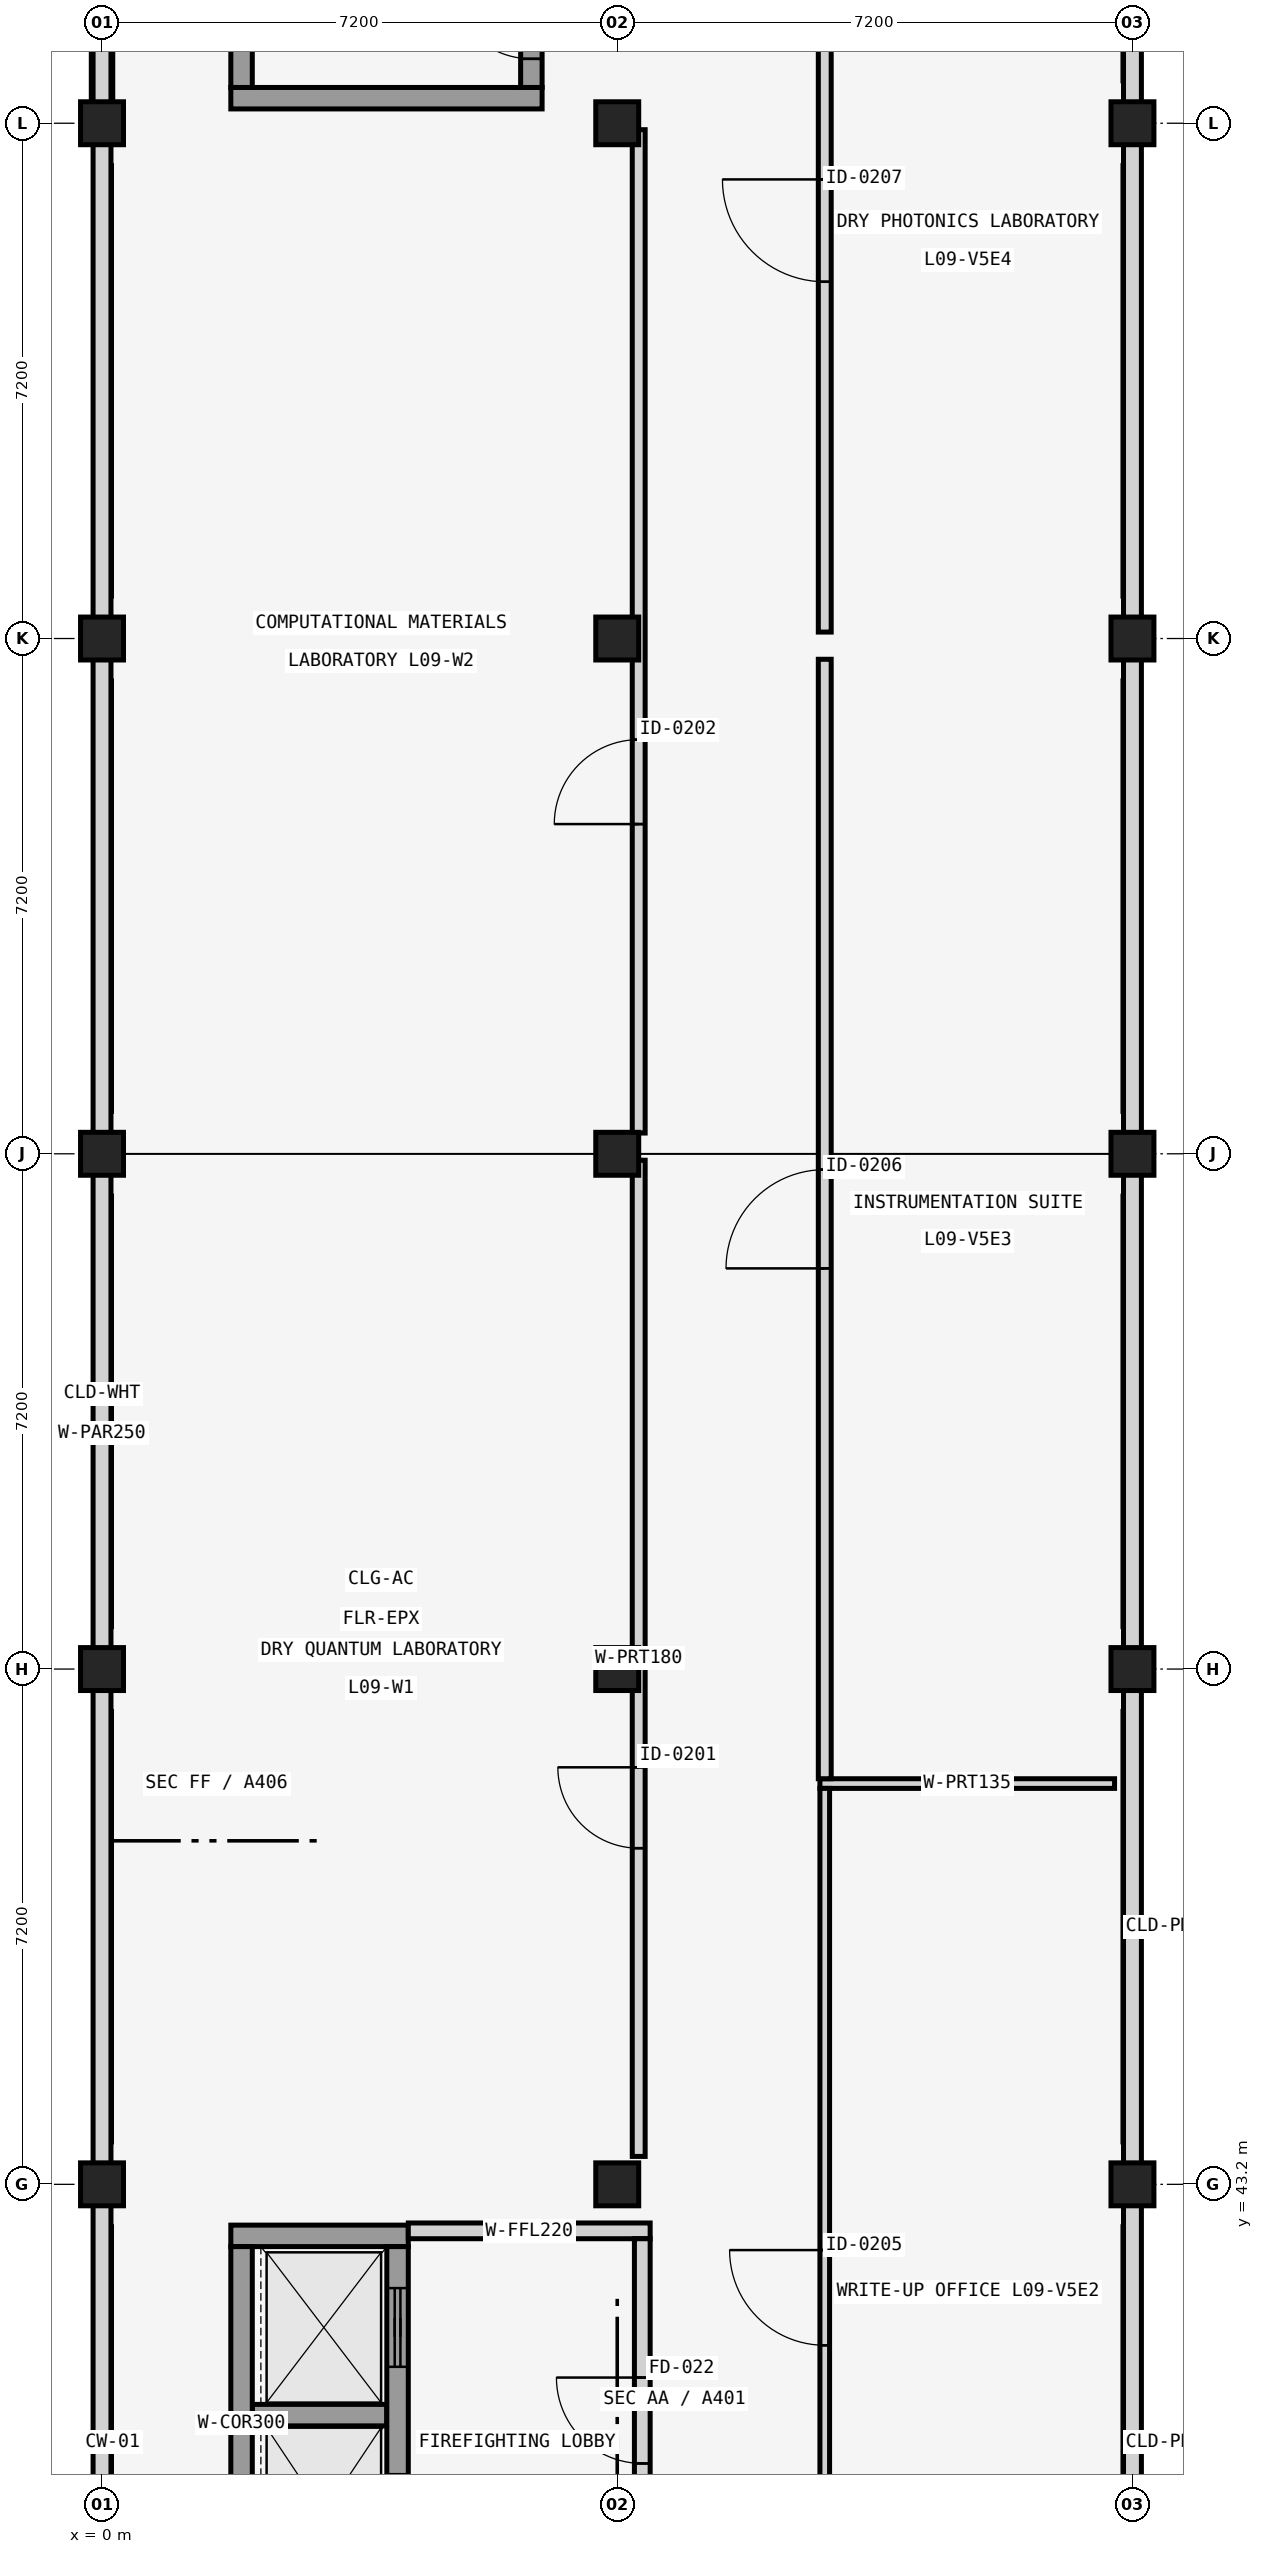
"""IFC4 building model, lengths in metres.
Left out: names, types, materials, properties, quantities, classifications, styles, units other than length and angle.
Written with IfcOpenShell. Run it as: python <this file> out.ifc"""

import sys

from ifc_helpers import new_model, si_unit, direction, frame, frame_2d, origin, origin_2d, place, context, subcontext, project, spatial, rectangle, extrude, element, fill, save


model = new_model("IFC4")
c1 = context("Model", 3, precision=1e-05, world=origin(), true_north=direction((0.0, 1.0)))
c2 = subcontext(c1, "Body", "Model", "MODEL_VIEW")
j1 = project(units=[si_unit("LENGTHUNIT", "METRE"), si_unit("PLANEANGLEUNIT", "RADIAN")], contexts=[c1])
p1 = place(None, origin())
s1 = spatial("IfcSite", under=j1, at=p1, CompositionType="ELEMENT")
p2 = place(p1, origin())
s2 = spatial("IfcBuilding", under=s1, at=p2, CompositionType="ELEMENT")
p3 = place(p2, frame((0.0, 0.0, 38.08)))
s3 = spatial("IfcBuildingStorey", under=s2, at=p3, CompositionType="ELEMENT", Elevation=38.08)
for number, where, z_axis, x_axis in (
    (1, (0.0, 43.2, 0.0), (0.0, 0.0, 1.0), (1.0, 0.0, 0.0)),
    (2, (0.0, 50.4, 0.0), (0.0, 0.0, 1.0), (1.0, 0.0, 0.0)),
    (3, (0.0, 57.6, 0.0), (0.0, 0.0, 1.0), (1.0, 0.0, 0.0)),
    (4, (0.0, 64.8, 0.0), (0.0, 0.0, 1.0), (1.0, 0.0, 0.0)),
    (5, (0.0, 72.0, 0.0), (0.0, 0.0, 1.0), (1.0, 0.0, 0.0)),
    (6, (7.2, 43.2, 0.0), (0.0, 0.0, 1.0), (1.0, 0.0, 0.0)),
    (7, (7.2, 50.4, 0.0), (0.0, 0.0, 1.0), (1.0, 0.0, 0.0)),
    (8, (7.2, 57.6, 0.0), (0.0, 0.0, 1.0), (1.0, 0.0, 0.0)),
    (9, (7.2, 64.8, 0.0), (0.0, 0.0, 1.0), (1.0, 0.0, 0.0)),
    (10, (7.2, 72.0, 0.0), (0.0, 0.0, 1.0), (1.0, 0.0, 0.0)),
    (11, (14.4, 43.2, 0.0), (0.0, 0.0, 1.0), (1.0, 0.0, 0.0)),
    (12, (14.4, 50.4, 0.0), (0.0, 0.0, 1.0), (1.0, 0.0, 0.0)),
    (13, (14.4, 57.6, 0.0), (0.0, 0.0, 1.0), (1.0, 0.0, 0.0)),
    (14, (14.4, 64.8, 0.0), (0.0, 0.0, 1.0), (1.0, 0.0, 0.0)),
    (15, (14.4, 72.0, 0.0), (0.0, 0.0, 1.0), (1.0, 0.0, 0.0)),
):
    element("IfcColumn", number, at=place(p3, frame(where, z_axis=z_axis, x_axis=x_axis)), inside=s3, PredefinedType="COLUMN", context=c2, shape_type="SweptSolid", body=[
        extrude(rectangle(XDim=0.6, YDim=0.6, at=origin_2d()), origin(), (0.0, 0.0, 1.0), 4.16),
    ])
p4 = place(p3, frame((0.0, 72.29, 0.0), z_axis=(0.0, 0.0, 1.0), x_axis=(0.0, 1.0, 0.0)))
e16 = element("IfcWall", 16, at=p4, inside=s3, PredefinedType="SOLIDWALL", context=c2, shape_type="SweptSolid", body=[
    extrude(rectangle(XDim=6.62, YDim=0.3, at=frame_2d((3.31, 0.0))), origin(), (0.0, 0.0, 1.0), 4.16),
])
p5 = place(p4, frame((3.085, 0.0, 1.0)))
e17 = element("IfcOpeningElement", 17, at=p5, cuts=e16, PredefinedType="OPENING", context=c2, shape_type="SweptSolid", body=[
    extrude(rectangle(XDim=0.45, YDim=2.4, at=frame_2d((0.225, 1.2))), frame((0.0, 0.16, 0.0), z_axis=(0.0, -1.0, 0.0), x_axis=(1.0, 0.0, 0.0)), (0.0, 0.0, 1.0), 0.32),
])
for number, where, z_axis, x_axis in (
    (18, (0.0, 21.0, 4.16), (0.0, 0.0, 1.0), (0.0, 1.0, 0.0)),
    (19, (14.4, 21.0, 4.16), (0.0, 0.0, 1.0), (0.0, 1.0, 0.0)),
):
    element("IfcWall", number, at=place(p3, frame(where, z_axis=z_axis, x_axis=x_axis)), inside=s3, PredefinedType="PARAPET", context=c2, shape_type="SweptSolid", body=[
        extrude(rectangle(XDim=65.4, YDim=0.25, at=frame_2d((32.7, 0.0))), origin(), (0.0, 0.0, 1.0), 0.9),
    ])
p6 = place(p3, frame((1.8, 42.48, 0.0), z_axis=(0.0, 0.0, 1.0), x_axis=(1.0, 0.0, 0.0)))
e20 = element("IfcWall", 20, at=p6, inside=s3, PredefinedType="SHEAR", context=c2, shape_type="SweptSolid", body=[
    extrude(rectangle(XDim=2.48, YDim=0.3, at=frame_2d((1.24, 0.0))), origin(), (0.0, 0.0, 1.0), 3.88),
])
p7 = place(p3, frame((2.1, 39.975, 0.0), z_axis=(0.0, 0.0, 1.0), x_axis=(1.0, 0.0, 0.0)))
e21 = element("IfcWall", 21, at=p7, inside=s3, PredefinedType="SHEAR", context=c2, shape_type="SweptSolid", body=[
    extrude(rectangle(XDim=1.88, YDim=0.3, at=frame_2d((0.94, 0.0))), origin(), (0.0, 0.0, 1.0), 3.88),
])
p8 = place(p3, frame((1.95, 37.4, 0.0), z_axis=(0.0, 0.0, 1.0), x_axis=(0.0, 1.0, 0.0)))
e22 = element("IfcWall", 22, at=p8, inside=s3, PredefinedType="SHEAR", context=c2, shape_type="SweptSolid", body=[
    extrude(rectangle(XDim=4.93, YDim=0.3, at=frame_2d((2.465, 0.0))), origin(), (0.0, 0.0, 1.0), 3.88),
])
p9 = place(p3, frame((4.13, 37.4, 0.0), z_axis=(0.0, 0.0, 1.0), x_axis=(0.0, 1.0, 0.0)))
e23 = element("IfcWall", 23, at=p9, inside=s3, PredefinedType="SHEAR", context=c2, shape_type="SweptSolid", body=[
    extrude(rectangle(XDim=4.93, YDim=0.3, at=frame_2d((2.465, 0.0))), origin(), (0.0, 0.0, 1.0), 3.88),
])
p10 = place(p9, frame((0.65, 0.0, 0.0)))
e24 = element("IfcOpeningElement", 24, at=p10, cuts=e23, PredefinedType="OPENING", context=c2, shape_type="SweptSolid", body=[
    extrude(rectangle(XDim=1.1, YDim=2.2, at=frame_2d((0.55, 1.1))), frame((0.0, 0.16, 0.0), z_axis=(0.0, -1.0, 0.0), x_axis=(1.0, 0.0, 0.0)), (0.0, 0.0, 1.0), 0.32),
])
p11 = place(p9, frame((3.25, 0.0, 0.0)))
e25 = element("IfcOpeningElement", 25, at=p11, cuts=e23, PredefinedType="OPENING", context=c2, shape_type="SweptSolid", body=[
    extrude(rectangle(XDim=1.1, YDim=2.2, at=frame_2d((0.55, 1.1))), frame((0.0, 0.16, 0.0), z_axis=(0.0, -1.0, 0.0), x_axis=(1.0, 0.0, 0.0)), (0.0, 0.0, 1.0), 0.32),
])
p12 = place(p3, frame((4.28, 42.55, 0.0), z_axis=(0.0, 0.0, 1.0), x_axis=(1.0, 0.0, 0.0)))
e26 = element("IfcWall", 26, at=p12, inside=s3, PredefinedType="SOLIDWALL", context=c2, shape_type="SweptSolid", body=[
    extrude(rectangle(XDim=3.38, YDim=0.22, at=frame_2d((1.69, 0.0))), origin(), (0.0, 0.0, 1.0), 3.28),
])
p13 = place(p3, frame((7.55, 37.36, 0.0), z_axis=(0.0, 0.0, 1.0), x_axis=(0.0, 1.0, 0.0)))
e27 = element("IfcWall", 27, at=p13, inside=s3, PredefinedType="SOLIDWALL", context=c2, shape_type="SweptSolid", body=[
    extrude(rectangle(XDim=5.08, YDim=0.22, at=frame_2d((2.54, 0.0))), origin(), (0.0, 0.0, 1.0), 3.88),
])
p14 = place(p13, frame((1.94, 0.0, 0.0)))
e28 = element("IfcOpeningElement", 28, at=p14, cuts=e27, PredefinedType="OPENING", context=c2, shape_type="SweptSolid", body=[
    extrude(rectangle(XDim=1.2, YDim=2.2, at=frame_2d((0.6, 1.1))), frame((0.0, 0.12, 0.0), z_axis=(0.0, -1.0, 0.0), x_axis=(1.0, 0.0, 0.0)), (0.0, 0.0, 1.0), 0.24),
])
p15 = place(p3, frame((1.8, 72.35, 0.0), z_axis=(0.0, 0.0, 1.0), x_axis=(1.0, 0.0, 0.0)))
e29 = element("IfcWall", 29, at=p15, inside=s3, PredefinedType="SHEAR", context=c2, shape_type="SweptSolid", body=[
    extrude(rectangle(XDim=4.35, YDim=0.3, at=frame_2d((2.175, 0.0))), origin(), (0.0, 0.0, 1.0), 3.88),
])
p16 = place(p3, frame((1.95, 72.5, 0.0), z_axis=(0.0, 0.0, 1.0), x_axis=(0.0, 1.0, 0.0)))
e30 = element("IfcWall", 30, at=p16, inside=s3, PredefinedType="SHEAR", context=c2, shape_type="SweptSolid", body=[
    extrude(rectangle(XDim=7.8, YDim=0.3, at=frame_2d((3.9, 0.0))), origin(), (0.0, 0.0, 1.0), 3.88),
])
p17 = place(p3, frame((6.0, 72.5, 0.0), z_axis=(0.0, 0.0, 1.0), x_axis=(0.0, 1.0, 0.0)))
e31 = element("IfcWall", 31, at=p17, inside=s3, PredefinedType="SHEAR", context=c2, shape_type="SweptSolid", body=[
    extrude(rectangle(XDim=7.8, YDim=0.3, at=frame_2d((3.9, 0.0))), origin(), (0.0, 0.0, 1.0), 3.88),
])
p18 = place(p17, frame((0.4, 0.0, 0.0)))
e32 = element("IfcOpeningElement", 32, at=p18, cuts=e31, PredefinedType="OPENING", context=c2, shape_type="SweptSolid", body=[
    extrude(rectangle(XDim=1.15, YDim=2.2, at=frame_2d((0.575, 1.1))), frame((0.0, 0.16, 0.0), z_axis=(0.0, -1.0, 0.0), x_axis=(1.0, 0.0, 0.0)), (0.0, 0.0, 1.0), 0.32),
])
p19 = place(p3, frame((7.5, 43.59, 0.0), z_axis=(0.0, 0.0, 1.0), x_axis=(0.0, 1.0, 0.0)))
e33 = element("IfcWall", 33, at=p19, inside=s3, PredefinedType="PARTITIONING", context=c2, shape_type="SweptSolid", body=[
    extrude(rectangle(XDim=13.92, YDim=0.18, at=frame_2d((6.96, 0.0))), origin(), (0.0, 0.0, 1.0), 3.88),
])
p20 = place(p19, frame((4.307, 0.0, 0.0)))
e34 = element("IfcOpeningElement", 34, at=p20, cuts=e33, PredefinedType="OPENING", context=c2, shape_type="SweptSolid", body=[
    extrude(rectangle(XDim=1.13, YDim=2.08, at=frame_2d((0.565, 1.04))), frame((0.0, 0.1, 0.0), z_axis=(0.0, -1.0, 0.0), x_axis=(1.0, 0.0, 0.0)), (0.0, 0.0, 1.0), 0.2),
])
p21 = place(p3, frame((7.5, 57.89, 0.0), z_axis=(0.0, 0.0, 1.0), x_axis=(0.0, 1.0, 0.0)))
e35 = element("IfcWall", 35, at=p21, inside=s3, PredefinedType="PARTITIONING", context=c2, shape_type="SweptSolid", body=[
    extrude(rectangle(XDim=14.02, YDim=0.18, at=frame_2d((7.01, 0.0))), origin(), (0.0, 0.0, 1.0), 3.88),
])
p22 = place(p21, frame((4.317, 0.0, 0.0)))
e36 = element("IfcOpeningElement", 36, at=p22, cuts=e35, PredefinedType="OPENING", context=c2, shape_type="SweptSolid", body=[
    extrude(rectangle(XDim=1.18, YDim=2.08, at=frame_2d((0.59, 1.04))), frame((0.0, 0.1, 0.0), z_axis=(0.0, -1.0, 0.0), x_axis=(1.0, 0.0, 0.0)), (0.0, 0.0, 1.0), 0.2),
])
p23 = place(p3, frame((10.032, 48.8, 0.0), z_axis=(0.0, 0.0, 1.0), x_axis=(1.0, 0.0, 0.0)))
e37 = element("IfcWall", 37, at=p23, inside=s3, PredefinedType="PARTITIONING", context=c2, shape_type="SweptSolid", body=[
    extrude(rectangle(XDim=4.117, YDim=0.135, at=frame_2d((2.059, 0.0))), origin(), (0.0, 0.0, 1.0), 3.88),
])
p24 = place(p3, frame((10.1, 34.5, 0.0), z_axis=(0.0, 0.0, 1.0), x_axis=(0.0, 1.0, 0.0)))
e38 = element("IfcWall", 38, at=p24, inside=s3, PredefinedType="PARTITIONING", context=c2, shape_type="SweptSolid", body=[
    extrude(rectangle(XDim=14.232, YDim=0.135, at=frame_2d((7.116, 0.0))), origin(), (0.0, 0.0, 1.0), 3.88),
])
p25 = place(p24, frame((6.451, 0.0, 0.0)))
e39 = element("IfcOpeningElement", 39, at=p25, cuts=e38, PredefinedType="OPENING", context=c2, shape_type="SweptSolid", body=[
    extrude(rectangle(XDim=1.33, YDim=2.12, at=frame_2d((0.665, 1.06))), frame((0.0, 0.078, 0.0), z_axis=(0.0, -1.0, 0.0), x_axis=(1.0, 0.0, 0.0)), (0.0, 0.0, 1.0), 0.155),
])
p26 = place(p3, frame((10.1, 48.867, 0.0), z_axis=(0.0, 0.0, 1.0), x_axis=(0.0, 1.0, 0.0)))
e40 = element("IfcWall", 40, at=p26, inside=s3, PredefinedType="PARTITIONING", context=c2, shape_type="SweptSolid", body=[
    extrude(rectangle(XDim=15.643, YDim=0.18, at=frame_2d((7.821, 0.0))), origin(), (0.0, 0.0, 1.0), 3.88),
])
p27 = place(p26, frame((7.131, 0.0, 0.0)))
e41 = element("IfcOpeningElement", 41, at=p27, cuts=e40, PredefinedType="OPENING", context=c2, shape_type="SweptSolid", body=[
    extrude(rectangle(XDim=1.38, YDim=2.12, at=frame_2d((0.69, 1.06))), frame((0.0, 0.1, 0.0), z_axis=(0.0, -1.0, 0.0), x_axis=(1.0, 0.0, 0.0)), (0.0, 0.0, 1.0), 0.2),
])
p28 = place(p3, frame((10.1, 64.89, 0.0), z_axis=(0.0, 0.0, 1.0), x_axis=(0.0, 1.0, 0.0)))
e42 = element("IfcWall", 42, at=p28, inside=s3, PredefinedType="PARTITIONING", context=c2, shape_type="SweptSolid", body=[
    extrude(rectangle(XDim=11.22, YDim=0.18, at=frame_2d((5.61, 0.0))), origin(), (0.0, 0.0, 1.0), 3.88),
])
p29 = place(p28, frame((4.895, 0.0, 0.0)))
e43 = element("IfcOpeningElement", 43, at=p29, cuts=e42, PredefinedType="OPENING", context=c2, shape_type="SweptSolid", body=[
    extrude(rectangle(XDim=1.43, YDim=2.18, at=frame_2d((0.715, 1.09))), frame((0.0, 0.1, 0.0), z_axis=(0.0, -1.0, 0.0), x_axis=(1.0, 0.0, 0.0)), (0.0, 0.0, 1.0), 0.2),
])
p30 = place(p11, origin())
e44 = element("IfcDoor", 44, at=p30, inside=s3, OperationType="SLIDING_TO_LEFT", PredefinedType="DOOR", context=c2, shape_type="SweptSolid", body=[
    extrude(rectangle(XDim=1.1, YDim=2.2, at=frame_2d((0.55, 1.1))), frame((0.0, 0.025, 0.0), z_axis=(0.0, -1.0, 0.0), x_axis=(1.0, 0.0, 0.0)), (0.0, 0.0, 1.0), 0.05),
])
fill(e25, e44)
p31 = place(p14, origin())
e45 = element("IfcDoor", 45, at=p31, inside=s3, OperationType="SINGLE_SWING_RIGHT", PredefinedType="DOOR", context=c2, shape_type="SweptSolid", body=[
    extrude(rectangle(XDim=1.2, YDim=2.2, at=frame_2d((0.6, 1.1))), frame((0.0, 0.025, 0.0), z_axis=(0.0, -1.0, 0.0), x_axis=(1.0, 0.0, 0.0)), (0.0, 0.0, 1.0), 0.05),
])
fill(e28, e45)
p32 = place(p18, origin())
e46 = element("IfcDoor", 46, at=p32, inside=s3, OperationType="SINGLE_SWING_RIGHT", PredefinedType="DOOR", context=c2, shape_type="SweptSolid", body=[
    extrude(rectangle(XDim=1.15, YDim=2.2, at=frame_2d((0.575, 1.1))), frame((0.0, 0.025, 0.0), z_axis=(0.0, -1.0, 0.0), x_axis=(1.0, 0.0, 0.0)), (0.0, 0.0, 1.0), 0.05),
])
fill(e32, e46)
p33 = place(p20, origin())
e47 = element("IfcDoor", 47, at=p33, inside=s3, OperationType="SINGLE_SWING_RIGHT", PredefinedType="DOOR", context=c2, shape_type="SweptSolid", body=[
    extrude(rectangle(XDim=1.13, YDim=2.08, at=frame_2d((0.565, 1.04))), frame((0.0, 0.025, 0.0), z_axis=(0.0, -1.0, 0.0), x_axis=(1.0, 0.0, 0.0)), (0.0, 0.0, 1.0), 0.05),
])
fill(e34, e47)
p34 = place(p22, origin())
e48 = element("IfcDoor", 48, at=p34, inside=s3, OperationType="SINGLE_SWING_LEFT", PredefinedType="DOOR", context=c2, shape_type="SweptSolid", body=[
    extrude(rectangle(XDim=1.18, YDim=2.08, at=frame_2d((0.59, 1.04))), frame((0.0, 0.025, 0.0), z_axis=(0.0, -1.0, 0.0), x_axis=(1.0, 0.0, 0.0)), (0.0, 0.0, 1.0), 0.05),
])
fill(e36, e48)
p35 = place(p25, origin())
e49 = element("IfcDoor", 49, at=p35, inside=s3, OperationType="SINGLE_SWING_RIGHT", PredefinedType="DOOR", context=c2, shape_type="SweptSolid", body=[
    extrude(rectangle(XDim=1.33, YDim=2.12, at=frame_2d((0.665, 1.06))), frame((0.0, 0.025, 0.0), z_axis=(0.0, -1.0, 0.0), x_axis=(1.0, 0.0, 0.0)), (0.0, 0.0, 1.0), 0.05),
])
fill(e39, e49)
p36 = place(p27, origin())
e50 = element("IfcDoor", 50, at=p36, inside=s3, OperationType="SINGLE_SWING_LEFT", PredefinedType="DOOR", context=c2, shape_type="SweptSolid", body=[
    extrude(rectangle(XDim=1.38, YDim=2.12, at=frame_2d((0.69, 1.06))), frame((0.0, 0.025, 0.0), z_axis=(0.0, -1.0, 0.0), x_axis=(1.0, 0.0, 0.0)), (0.0, 0.0, 1.0), 0.05),
])
fill(e41, e50)
p37 = place(p29, origin())
e51 = element("IfcDoor", 51, at=p37, inside=s3, OperationType="SINGLE_SWING_RIGHT", PredefinedType="DOOR", context=c2, shape_type="SweptSolid", body=[
    extrude(rectangle(XDim=1.43, YDim=2.18, at=frame_2d((0.715, 1.09))), frame((0.0, 0.025, 0.0), z_axis=(0.0, -1.0, 0.0), x_axis=(1.0, 0.0, 0.0)), (0.0, 0.0, 1.0), 0.05),
])
fill(e43, e51)
save(model, sys.argv[1])
